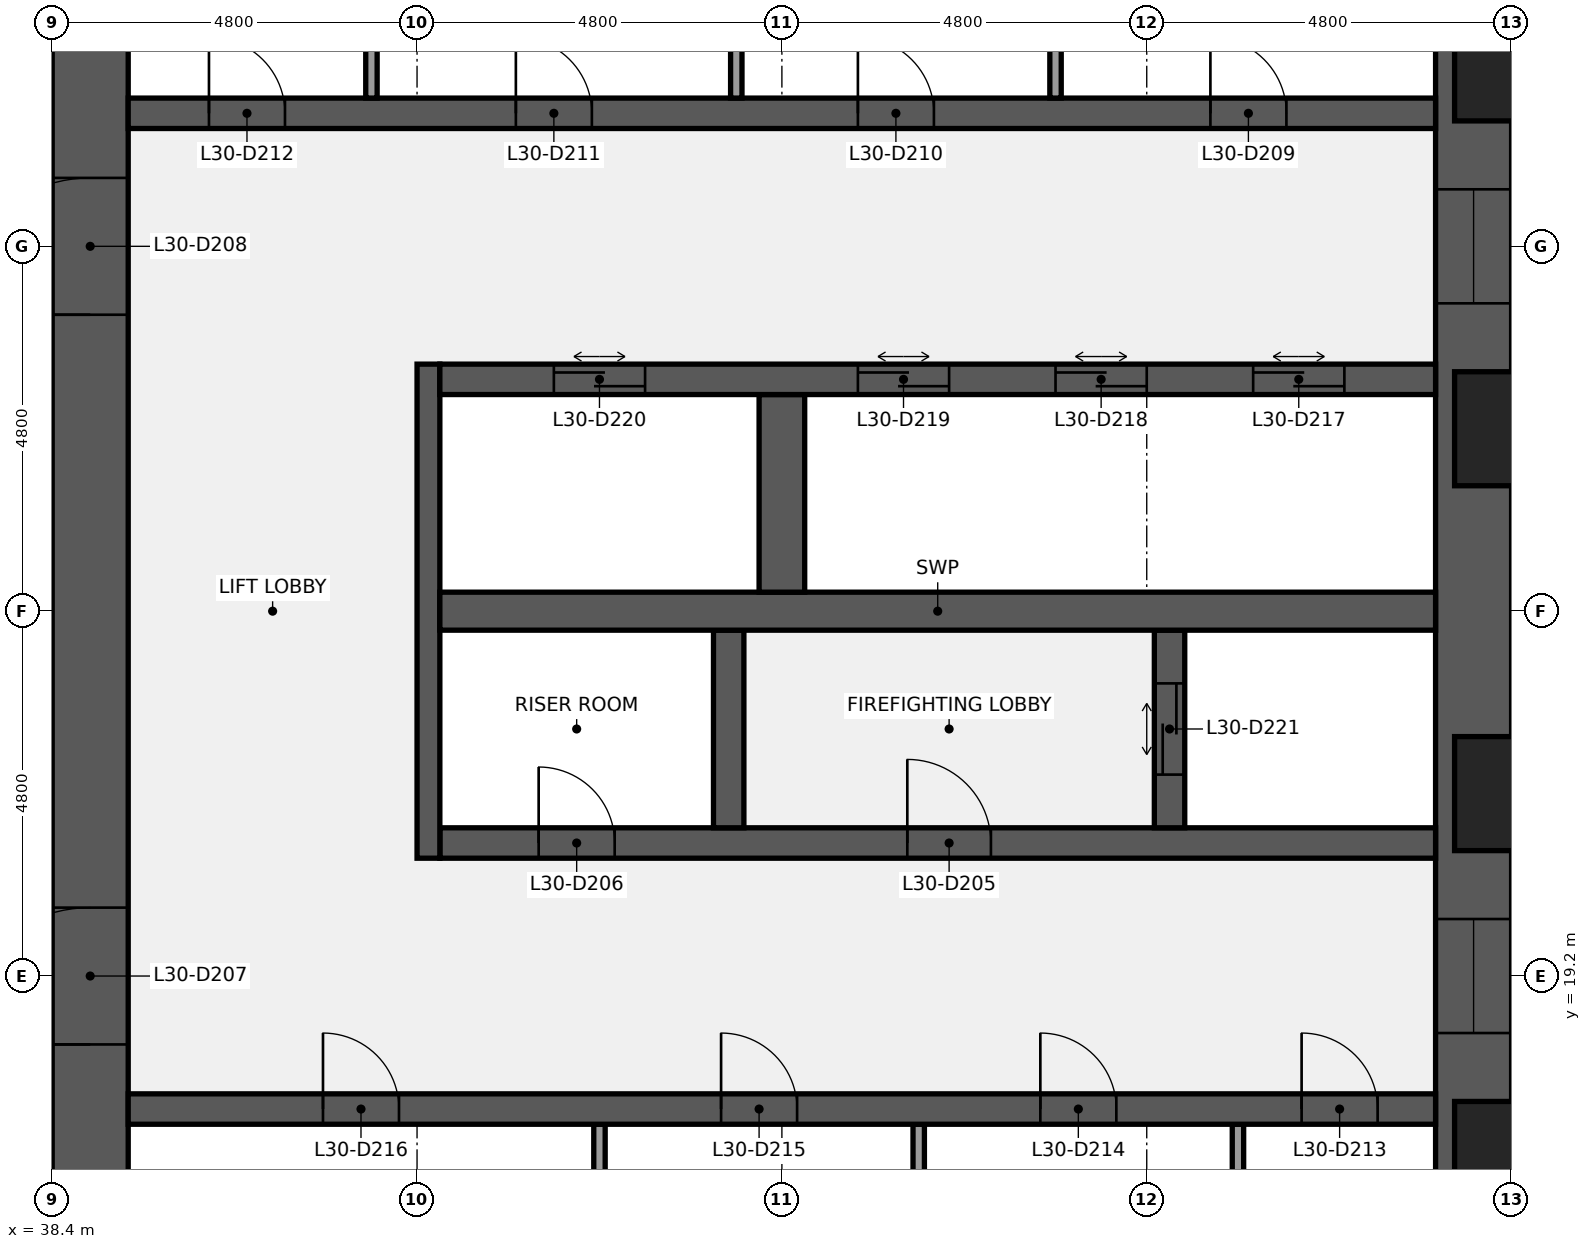
"""IFC4 building model, lengths in metres.
Left out: names, types, materials, properties, quantities, classifications, styles, units other than length and angle.
Written with IfcOpenShell. Run it as: python <this file> out.ifc"""

import sys

from ifc_helpers import new_model, si_unit, direction, frame, frame_2d, origin, place, context, subcontext, project, spatial, rectangle, extrude, element, fill, save


model = new_model("IFC4")
c1 = context("Model", 3, precision=1e-05, world=origin(), true_north=direction((0.0, 1.0)))
c2 = subcontext(c1, "Body", "Model", "MODEL_VIEW")
j1 = project(units=[si_unit("LENGTHUNIT", "METRE"), si_unit("PLANEANGLEUNIT", "RADIAN")], contexts=[c1])
p1 = place(None, origin())
s1 = spatial("IfcSite", under=j1, at=p1, CompositionType="ELEMENT")
p2 = place(p1, origin())
s2 = spatial("IfcBuilding", under=s1, at=p2, CompositionType="ELEMENT")
p3 = place(p2, frame((0.0, 0.0, 140.1)))
s3 = spatial("IfcBuildingStorey", under=s2, at=p3, CompositionType="ELEMENT", Elevation=140.1)
p4 = place(p3, frame((57.1, 38.4, 0.0), z_axis=(0.0, 0.0, 1.0), x_axis=(0.0, -1.0, 0.0)))
e1 = element("IfcWall", 1, at=p4, inside=s3, PredefinedType="SHEAR", context=c2, shape_type="SweptSolid", body=[
    extrude(rectangle(XDim=28.8, YDim=1.0, at=frame_2d((14.4, 0.0))), origin(), (0.0, 0.0, 1.0), 3.84),
])
p5 = place(p4, frame((18.45, 0.0, 0.9)))
e2 = element("IfcOpeningElement", 2, at=p5, cuts=e1, PredefinedType="OPENING", context=c2, shape_type="SweptSolid", body=[
    extrude(rectangle(XDim=1.5, YDim=1.5, at=frame_2d((0.75, 0.75))), frame((0.0, 0.51, 0.0), z_axis=(0.0, -1.0, 0.0), x_axis=(1.0, 0.0, 0.0)), (0.0, 0.0, 1.0), 1.02),
])
p6 = place(p4, frame((8.85, 0.0, 0.9)))
e3 = element("IfcOpeningElement", 3, at=p6, cuts=e1, PredefinedType="OPENING", context=c2, shape_type="SweptSolid", body=[
    extrude(rectangle(XDim=1.5, YDim=1.5, at=frame_2d((0.75, 0.75))), frame((0.0, 0.51, 0.0), z_axis=(0.0, -1.0, 0.0), x_axis=(1.0, 0.0, 0.0)), (0.0, 0.0, 1.0), 1.02),
])
p7 = place(p3, frame((38.9, 9.6, 0.0), z_axis=(0.0, 0.0, 1.0), x_axis=(0.0, 1.0, 0.0)))
e4 = element("IfcWall", 4, at=p7, inside=s3, PredefinedType="SHEAR", context=c2, shape_type="SweptSolid", body=[
    extrude(rectangle(XDim=28.8, YDim=1.0, at=frame_2d((14.4, 0.0))), origin(), (0.0, 0.0, 1.0), 3.84),
])
p8 = place(p7, frame((8.7, 0.0, 0.0)))
e5 = element("IfcOpeningElement", 5, at=p8, cuts=e4, PredefinedType="OPENING", context=c2, shape_type="SweptSolid", body=[
    extrude(rectangle(XDim=1.8, YDim=2.1, at=frame_2d((0.9, 1.05))), frame((0.0, 0.51, 0.0), z_axis=(0.0, -1.0, 0.0), x_axis=(1.0, 0.0, 0.0)), (0.0, 0.0, 1.0), 1.02),
])
p9 = place(p7, frame((18.3, 0.0, 0.0)))
e6 = element("IfcOpeningElement", 6, at=p9, cuts=e4, PredefinedType="OPENING", context=c2, shape_type="SweptSolid", body=[
    extrude(rectangle(XDim=1.8, YDim=2.1, at=frame_2d((0.9, 1.05))), frame((0.0, 0.51, 0.0), z_axis=(0.0, -1.0, 0.0), x_axis=(1.0, 0.0, 0.0)), (0.0, 0.0, 1.0), 1.02),
])
for number, where, z_axis, x_axis in (
    (7, (54.0, 14.65, 0.0), (0.0, 0.0, 1.0), (0.0, 1.0, 0.0)),
    (8, (49.8, 14.65, 0.0), (0.0, 0.0, 1.0), (0.0, 1.0, 0.0)),
    (9, (45.6, 14.65, 0.0), (0.0, 0.0, 1.0), (0.0, 1.0, 0.0)),
):
    element("IfcWall", number, at=place(p3, frame(where, z_axis=z_axis, x_axis=x_axis)), inside=s3, PredefinedType="PARTITIONING", context=c2, shape_type="SweptSolid", body=[
        extrude(rectangle(XDim=2.6, YDim=0.15, at=frame_2d((1.3, 0.0))), origin(), (0.0, 0.0, 1.0), 3.84),
    ])
p10 = place(p3, frame((39.4, 17.45, 0.0), z_axis=(0.0, 0.0, 1.0), x_axis=(1.0, 0.0, 0.0)))
e10 = element("IfcWall", 10, at=p10, inside=s3, PredefinedType="SHEAR", context=c2, shape_type="SweptSolid", body=[
    extrude(rectangle(XDim=17.2, YDim=0.4, at=frame_2d((8.6, 0.0))), origin(), (0.0, 0.0, 1.0), 3.84),
])
p11 = place(p10, frame((15.438, 0.0, 0.0)))
e11 = element("IfcOpeningElement", 11, at=p11, cuts=e10, PredefinedType="OPENING", context=c2, shape_type="SweptSolid", body=[
    extrude(rectangle(XDim=1.0, YDim=2.1, at=frame_2d((0.5, 1.05))), frame((0.0, 0.21, 0.0), z_axis=(0.0, -1.0, 0.0), x_axis=(1.0, 0.0, 0.0)), (0.0, 0.0, 1.0), 0.42),
])
p12 = place(p10, frame((12.0, 0.0, 0.0)))
e12 = element("IfcOpeningElement", 12, at=p12, cuts=e10, PredefinedType="OPENING", context=c2, shape_type="SweptSolid", body=[
    extrude(rectangle(XDim=1.0, YDim=2.1, at=frame_2d((0.5, 1.05))), frame((0.0, 0.21, 0.0), z_axis=(0.0, -1.0, 0.0), x_axis=(1.0, 0.0, 0.0)), (0.0, 0.0, 1.0), 0.42),
])
p13 = place(p10, frame((7.8, 0.0, 0.0)))
e13 = element("IfcOpeningElement", 13, at=p13, cuts=e10, PredefinedType="OPENING", context=c2, shape_type="SweptSolid", body=[
    extrude(rectangle(XDim=1.0, YDim=2.1, at=frame_2d((0.5, 1.05))), frame((0.0, 0.21, 0.0), z_axis=(0.0, -1.0, 0.0), x_axis=(1.0, 0.0, 0.0)), (0.0, 0.0, 1.0), 0.42),
])
p14 = place(p10, frame((2.562, 0.0, 0.0)))
e14 = element("IfcOpeningElement", 14, at=p14, cuts=e10, PredefinedType="OPENING", context=c2, shape_type="SweptSolid", body=[
    extrude(rectangle(XDim=1.0, YDim=2.1, at=frame_2d((0.5, 1.05))), frame((0.0, 0.21, 0.0), z_axis=(0.0, -1.0, 0.0), x_axis=(1.0, 0.0, 0.0)), (0.0, 0.0, 1.0), 0.42),
])
p15 = place(p3, frame((43.5, 20.95, 0.0), z_axis=(0.0, 0.0, 1.0), x_axis=(1.0, 0.0, 0.0)))
e15 = element("IfcWall", 15, at=p15, inside=s3, PredefinedType="SHEAR", context=c2, shape_type="SweptSolid", body=[
    extrude(rectangle(XDim=13.1, YDim=0.4, at=frame_2d((6.55, 0.0))), origin(), (0.0, 0.0, 1.0), 3.84),
])
p16 = place(p15, frame((6.15, 0.0, 0.0)))
e16 = element("IfcOpeningElement", 16, at=p16, cuts=e15, PredefinedType="OPENING", context=c2, shape_type="SweptSolid", body=[
    extrude(rectangle(XDim=1.1, YDim=2.1, at=frame_2d((0.55, 1.05))), frame((0.0, 0.21, 0.0), z_axis=(0.0, -1.0, 0.0), x_axis=(1.0, 0.0, 0.0)), (0.0, 0.0, 1.0), 0.42),
])
p17 = place(p15, frame((1.3, 0.0, 0.0)))
e17 = element("IfcOpeningElement", 17, at=p17, cuts=e15, PredefinedType="OPENING", context=c2, shape_type="SweptSolid", body=[
    extrude(rectangle(XDim=1.0, YDim=2.1, at=frame_2d((0.5, 1.05))), frame((0.0, 0.21, 0.0), z_axis=(0.0, -1.0, 0.0), x_axis=(1.0, 0.0, 0.0)), (0.0, 0.0, 1.0), 0.42),
])
p18 = place(p3, frame((43.35, 20.75, 0.0), z_axis=(0.0, 0.0, 1.0), x_axis=(0.0, 1.0, 0.0)))
e18 = element("IfcWall", 18, at=p18, inside=s3, PredefinedType="SHEAR", context=c2, shape_type="SweptSolid", body=[
    extrude(rectangle(XDim=6.5, YDim=0.3, at=frame_2d((3.25, 0.0))), origin(), (0.0, 0.0, 1.0), 3.84),
])
p19 = place(p3, frame((53.1, 21.15, 0.0), z_axis=(0.0, 0.0, 1.0), x_axis=(0.0, 1.0, 0.0)))
e19 = element("IfcWall", 19, at=p19, inside=s3, PredefinedType="SHEAR", context=c2, shape_type="SweptSolid", body=[
    extrude(rectangle(XDim=2.6, YDim=0.4, at=frame_2d((1.3, 0.0))), origin(), (0.0, 0.0, 1.0), 3.84),
])
p20 = place(p19, frame((0.7, 0.0, 0.0)))
e20 = element("IfcOpeningElement", 20, at=p20, cuts=e19, PredefinedType="OPENING", context=c2, shape_type="SweptSolid", body=[
    extrude(rectangle(XDim=1.2, YDim=2.1, at=frame_2d((0.6, 1.05))), frame((0.0, 0.21, 0.0), z_axis=(0.0, -1.0, 0.0), x_axis=(1.0, 0.0, 0.0)), (0.0, 0.0, 1.0), 0.42),
])
p21 = place(p3, frame((47.3, 21.15, 0.0), z_axis=(0.0, 0.0, 1.0), x_axis=(0.0, 1.0, 0.0)))
e21 = element("IfcWall", 21, at=p21, inside=s3, PredefinedType="SHEAR", context=c2, shape_type="SweptSolid", body=[
    extrude(rectangle(XDim=2.6, YDim=0.4, at=frame_2d((1.3, 0.0))), origin(), (0.0, 0.0, 1.0), 3.84),
])
p22 = place(p3, frame((43.5, 24.0, 0.0), z_axis=(0.0, 0.0, 1.0), x_axis=(1.0, 0.0, 0.0)))
e22 = element("IfcWall", 22, at=p22, inside=s3, PredefinedType="SHEAR", context=c2, shape_type="SweptSolid", body=[
    extrude(rectangle(XDim=13.1, YDim=0.5, at=frame_2d((6.55, 0.0))), origin(), (0.0, 0.0, 1.0), 3.84),
])
p23 = place(p3, frame((48.0, 24.25, 0.0), z_axis=(0.0, 0.0, 1.0), x_axis=(0.0, 1.0, 0.0)))
e23 = element("IfcWall", 23, at=p23, inside=s3, PredefinedType="SHEAR", context=c2, shape_type="SweptSolid", body=[
    extrude(rectangle(XDim=2.6, YDim=0.6, at=frame_2d((1.3, 0.0))), origin(), (0.0, 0.0, 1.0), 3.84),
])
p24 = place(p3, frame((43.5, 27.05, 0.0), z_axis=(0.0, 0.0, 1.0), x_axis=(1.0, 0.0, 0.0)))
e24 = element("IfcWall", 24, at=p24, inside=s3, PredefinedType="SHEAR", context=c2, shape_type="SweptSolid", body=[
    extrude(rectangle(XDim=13.1, YDim=0.4, at=frame_2d((6.55, 0.0))), origin(), (0.0, 0.0, 1.0), 3.84),
])
p25 = place(p24, frame((10.7, 0.0, 0.0)))
e25 = element("IfcOpeningElement", 25, at=p25, cuts=e24, PredefinedType="OPENING", context=c2, shape_type="SweptSolid", body=[
    extrude(rectangle(XDim=1.2, YDim=2.1, at=frame_2d((0.6, 1.05))), frame((0.0, 0.21, 0.0), z_axis=(0.0, -1.0, 0.0), x_axis=(1.0, 0.0, 0.0)), (0.0, 0.0, 1.0), 0.42),
])
p26 = place(p24, frame((8.1, 0.0, 0.0)))
e26 = element("IfcOpeningElement", 26, at=p26, cuts=e24, PredefinedType="OPENING", context=c2, shape_type="SweptSolid", body=[
    extrude(rectangle(XDim=1.2, YDim=2.1, at=frame_2d((0.6, 1.05))), frame((0.0, 0.21, 0.0), z_axis=(0.0, -1.0, 0.0), x_axis=(1.0, 0.0, 0.0)), (0.0, 0.0, 1.0), 0.42),
])
p27 = place(p24, frame((5.5, 0.0, 0.0)))
e27 = element("IfcOpeningElement", 27, at=p27, cuts=e24, PredefinedType="OPENING", context=c2, shape_type="SweptSolid", body=[
    extrude(rectangle(XDim=1.2, YDim=2.1, at=frame_2d((0.6, 1.05))), frame((0.0, 0.21, 0.0), z_axis=(0.0, -1.0, 0.0), x_axis=(1.0, 0.0, 0.0)), (0.0, 0.0, 1.0), 0.42),
])
p28 = place(p24, frame((1.5, 0.0, 0.0)))
e28 = element("IfcOpeningElement", 28, at=p28, cuts=e24, PredefinedType="OPENING", context=c2, shape_type="SweptSolid", body=[
    extrude(rectangle(XDim=1.2, YDim=2.1, at=frame_2d((0.6, 1.05))), frame((0.0, 0.21, 0.0), z_axis=(0.0, -1.0, 0.0), x_axis=(1.0, 0.0, 0.0)), (0.0, 0.0, 1.0), 0.42),
])
p29 = place(p3, frame((39.4, 30.55, 0.0), z_axis=(0.0, 0.0, 1.0), x_axis=(1.0, 0.0, 0.0)))
e29 = element("IfcWall", 29, at=p29, inside=s3, PredefinedType="SHEAR", context=c2, shape_type="SweptSolid", body=[
    extrude(rectangle(XDim=17.2, YDim=0.4, at=frame_2d((8.6, 0.0))), origin(), (0.0, 0.0, 1.0), 3.84),
])
p30 = place(p29, frame((14.238, 0.0, 0.0)))
e30 = element("IfcOpeningElement", 30, at=p30, cuts=e29, PredefinedType="OPENING", context=c2, shape_type="SweptSolid", body=[
    extrude(rectangle(XDim=1.0, YDim=2.1, at=frame_2d((0.5, 1.05))), frame((0.0, 0.21, 0.0), z_axis=(0.0, -1.0, 0.0), x_axis=(1.0, 0.0, 0.0)), (0.0, 0.0, 1.0), 0.42),
])
p31 = place(p29, frame((9.6, 0.0, 0.0)))
e31 = element("IfcOpeningElement", 31, at=p31, cuts=e29, PredefinedType="OPENING", context=c2, shape_type="SweptSolid", body=[
    extrude(rectangle(XDim=1.0, YDim=2.1, at=frame_2d((0.5, 1.05))), frame((0.0, 0.21, 0.0), z_axis=(0.0, -1.0, 0.0), x_axis=(1.0, 0.0, 0.0)), (0.0, 0.0, 1.0), 0.42),
])
p32 = place(p29, frame((5.1, 0.0, 0.0)))
e32 = element("IfcOpeningElement", 32, at=p32, cuts=e29, PredefinedType="OPENING", context=c2, shape_type="SweptSolid", body=[
    extrude(rectangle(XDim=1.0, YDim=2.1, at=frame_2d((0.5, 1.05))), frame((0.0, 0.21, 0.0), z_axis=(0.0, -1.0, 0.0), x_axis=(1.0, 0.0, 0.0)), (0.0, 0.0, 1.0), 0.42),
])
p33 = place(p29, frame((1.062, 0.0, 0.0)))
e33 = element("IfcOpeningElement", 33, at=p33, cuts=e29, PredefinedType="OPENING", context=c2, shape_type="SweptSolid", body=[
    extrude(rectangle(XDim=1.0, YDim=2.1, at=frame_2d((0.5, 1.05))), frame((0.0, 0.21, 0.0), z_axis=(0.0, -1.0, 0.0), x_axis=(1.0, 0.0, 0.0)), (0.0, 0.0, 1.0), 0.42),
])
for number, where, z_axis, x_axis in (
    (34, (51.6, 30.75, 0.0), (0.0, 0.0, 1.0), (0.0, 1.0, 0.0)),
    (35, (47.4, 30.75, 0.0), (0.0, 0.0, 1.0), (0.0, 1.0, 0.0)),
    (36, (42.6, 30.75, 0.0), (0.0, 0.0, 1.0), (0.0, 1.0, 0.0)),
):
    element("IfcWall", number, at=place(p3, frame(where, z_axis=z_axis, x_axis=x_axis)), inside=s3, PredefinedType="PARTITIONING", context=c2, shape_type="SweptSolid", body=[
        extrude(rectangle(XDim=2.6, YDim=0.15, at=frame_2d((1.3, 0.0))), origin(), (0.0, 0.0, 1.0), 3.84),
    ])
p34 = place(p16, origin())
e37 = element("IfcDoor", 37, at=p34, inside=s3, OperationType="SINGLE_SWING_LEFT", PredefinedType="DOOR", context=c2, shape_type="SweptSolid", body=[
    extrude(rectangle(XDim=1.1, YDim=2.1, at=frame_2d((0.55, 1.05))), frame((0.0, 0.025, 0.0), z_axis=(0.0, -1.0, 0.0), x_axis=(1.0, 0.0, 0.0)), (0.0, 0.0, 1.0), 0.05),
])
fill(e16, e37)
p35 = place(p17, origin())
e38 = element("IfcDoor", 38, at=p35, inside=s3, OperationType="SINGLE_SWING_LEFT", PredefinedType="DOOR", context=c2, shape_type="SweptSolid", body=[
    extrude(rectangle(XDim=1.0, YDim=2.1, at=frame_2d((0.5, 1.05))), frame((0.0, 0.025, 0.0), z_axis=(0.0, -1.0, 0.0), x_axis=(1.0, 0.0, 0.0)), (0.0, 0.0, 1.0), 0.05),
])
fill(e17, e38)
p36 = place(p8, origin())
e39 = element("IfcDoor", 39, at=p36, inside=s3, OperationType="DOUBLE_DOOR_SINGLE_SWING", PredefinedType="DOOR", context=c2, shape_type="SweptSolid", body=[
    extrude(rectangle(XDim=1.8, YDim=2.1, at=frame_2d((0.9, 1.05))), frame((0.0, 0.025, 0.0), z_axis=(0.0, -1.0, 0.0), x_axis=(1.0, 0.0, 0.0)), (0.0, 0.0, 1.0), 0.05),
])
fill(e5, e39)
p37 = place(p9, origin())
e40 = element("IfcDoor", 40, at=p37, inside=s3, OperationType="DOUBLE_DOOR_SINGLE_SWING", PredefinedType="DOOR", context=c2, shape_type="SweptSolid", body=[
    extrude(rectangle(XDim=1.8, YDim=2.1, at=frame_2d((0.9, 1.05))), frame((0.0, 0.025, 0.0), z_axis=(0.0, -1.0, 0.0), x_axis=(1.0, 0.0, 0.0)), (0.0, 0.0, 1.0), 0.05),
])
fill(e6, e40)
p38 = place(p30, origin())
e41 = element("IfcDoor", 41, at=p38, inside=s3, OperationType="SINGLE_SWING_LEFT", PredefinedType="DOOR", context=c2, shape_type="SweptSolid", body=[
    extrude(rectangle(XDim=1.0, YDim=2.1, at=frame_2d((0.5, 1.05))), frame((0.0, 0.025, 0.0), z_axis=(0.0, -1.0, 0.0), x_axis=(1.0, 0.0, 0.0)), (0.0, 0.0, 1.0), 0.05),
])
fill(e30, e41)
p39 = place(p31, origin())
e42 = element("IfcDoor", 42, at=p39, inside=s3, OperationType="SINGLE_SWING_LEFT", PredefinedType="DOOR", context=c2, shape_type="SweptSolid", body=[
    extrude(rectangle(XDim=1.0, YDim=2.1, at=frame_2d((0.5, 1.05))), frame((0.0, 0.025, 0.0), z_axis=(0.0, -1.0, 0.0), x_axis=(1.0, 0.0, 0.0)), (0.0, 0.0, 1.0), 0.05),
])
fill(e31, e42)
p40 = place(p32, origin())
e43 = element("IfcDoor", 43, at=p40, inside=s3, OperationType="SINGLE_SWING_LEFT", PredefinedType="DOOR", context=c2, shape_type="SweptSolid", body=[
    extrude(rectangle(XDim=1.0, YDim=2.1, at=frame_2d((0.5, 1.05))), frame((0.0, 0.025, 0.0), z_axis=(0.0, -1.0, 0.0), x_axis=(1.0, 0.0, 0.0)), (0.0, 0.0, 1.0), 0.05),
])
fill(e32, e43)
p41 = place(p33, origin())
e44 = element("IfcDoor", 44, at=p41, inside=s3, OperationType="SINGLE_SWING_LEFT", PredefinedType="DOOR", context=c2, shape_type="SweptSolid", body=[
    extrude(rectangle(XDim=1.0, YDim=2.1, at=frame_2d((0.5, 1.05))), frame((0.0, 0.025, 0.0), z_axis=(0.0, -1.0, 0.0), x_axis=(1.0, 0.0, 0.0)), (0.0, 0.0, 1.0), 0.05),
])
fill(e33, e44)
p42 = place(p11, origin())
e45 = element("IfcDoor", 45, at=p42, inside=s3, OperationType="SINGLE_SWING_LEFT", PredefinedType="DOOR", context=c2, shape_type="SweptSolid", body=[
    extrude(rectangle(XDim=1.0, YDim=2.1, at=frame_2d((0.5, 1.05))), frame((0.0, 0.025, 0.0), z_axis=(0.0, -1.0, 0.0), x_axis=(1.0, 0.0, 0.0)), (0.0, 0.0, 1.0), 0.05),
])
fill(e11, e45)
p43 = place(p12, origin())
e46 = element("IfcDoor", 46, at=p43, inside=s3, OperationType="SINGLE_SWING_LEFT", PredefinedType="DOOR", context=c2, shape_type="SweptSolid", body=[
    extrude(rectangle(XDim=1.0, YDim=2.1, at=frame_2d((0.5, 1.05))), frame((0.0, 0.025, 0.0), z_axis=(0.0, -1.0, 0.0), x_axis=(1.0, 0.0, 0.0)), (0.0, 0.0, 1.0), 0.05),
])
fill(e12, e46)
p44 = place(p13, origin())
e47 = element("IfcDoor", 47, at=p44, inside=s3, OperationType="SINGLE_SWING_LEFT", PredefinedType="DOOR", context=c2, shape_type="SweptSolid", body=[
    extrude(rectangle(XDim=1.0, YDim=2.1, at=frame_2d((0.5, 1.05))), frame((0.0, 0.025, 0.0), z_axis=(0.0, -1.0, 0.0), x_axis=(1.0, 0.0, 0.0)), (0.0, 0.0, 1.0), 0.05),
])
fill(e13, e47)
p45 = place(p14, origin())
e48 = element("IfcDoor", 48, at=p45, inside=s3, OperationType="SINGLE_SWING_LEFT", PredefinedType="DOOR", context=c2, shape_type="SweptSolid", body=[
    extrude(rectangle(XDim=1.0, YDim=2.1, at=frame_2d((0.5, 1.05))), frame((0.0, 0.025, 0.0), z_axis=(0.0, -1.0, 0.0), x_axis=(1.0, 0.0, 0.0)), (0.0, 0.0, 1.0), 0.05),
])
fill(e14, e48)
p46 = place(p25, origin())
e49 = element("IfcDoor", 49, at=p46, inside=s3, OperationType="DOUBLE_DOOR_SLIDING", PredefinedType="DOOR", context=c2, shape_type="SweptSolid", body=[
    extrude(rectangle(XDim=1.2, YDim=2.1, at=frame_2d((0.6, 1.05))), frame((0.0, 0.025, 0.0), z_axis=(0.0, -1.0, 0.0), x_axis=(1.0, 0.0, 0.0)), (0.0, 0.0, 1.0), 0.05),
])
fill(e25, e49)
p47 = place(p26, origin())
e50 = element("IfcDoor", 50, at=p47, inside=s3, OperationType="DOUBLE_DOOR_SLIDING", PredefinedType="DOOR", context=c2, shape_type="SweptSolid", body=[
    extrude(rectangle(XDim=1.2, YDim=2.1, at=frame_2d((0.6, 1.05))), frame((0.0, 0.025, 0.0), z_axis=(0.0, -1.0, 0.0), x_axis=(1.0, 0.0, 0.0)), (0.0, 0.0, 1.0), 0.05),
])
fill(e26, e50)
p48 = place(p27, origin())
e51 = element("IfcDoor", 51, at=p48, inside=s3, OperationType="DOUBLE_DOOR_SLIDING", PredefinedType="DOOR", context=c2, shape_type="SweptSolid", body=[
    extrude(rectangle(XDim=1.2, YDim=2.1, at=frame_2d((0.6, 1.05))), frame((0.0, 0.025, 0.0), z_axis=(0.0, -1.0, 0.0), x_axis=(1.0, 0.0, 0.0)), (0.0, 0.0, 1.0), 0.05),
])
fill(e27, e51)
p49 = place(p28, origin())
e52 = element("IfcDoor", 52, at=p49, inside=s3, OperationType="DOUBLE_DOOR_SLIDING", PredefinedType="DOOR", context=c2, shape_type="SweptSolid", body=[
    extrude(rectangle(XDim=1.2, YDim=2.1, at=frame_2d((0.6, 1.05))), frame((0.0, 0.025, 0.0), z_axis=(0.0, -1.0, 0.0), x_axis=(1.0, 0.0, 0.0)), (0.0, 0.0, 1.0), 0.05),
])
fill(e28, e52)
p50 = place(p20, origin())
e53 = element("IfcDoor", 53, at=p50, inside=s3, OperationType="DOUBLE_DOOR_SLIDING", PredefinedType="DOOR", context=c2, shape_type="SweptSolid", body=[
    extrude(rectangle(XDim=1.2, YDim=2.1, at=frame_2d((0.6, 1.05))), frame((0.0, 0.025, 0.0), z_axis=(0.0, -1.0, 0.0), x_axis=(1.0, 0.0, 0.0)), (0.0, 0.0, 1.0), 0.05),
])
fill(e20, e53)
p51 = place(p5, origin())
e54 = element("IfcWindow", 54, at=p51, inside=s3, PartitioningType="SINGLE_PANEL", PredefinedType="WINDOW", context=c2, shape_type="SweptSolid", body=[
    extrude(rectangle(XDim=1.5, YDim=1.5, at=frame_2d((0.75, 0.75))), frame((0.0, 0.03, 0.0), z_axis=(0.0, -1.0, 0.0), x_axis=(1.0, 0.0, 0.0)), (0.0, 0.0, 1.0), 0.06),
])
fill(e2, e54)
p52 = place(p6, origin())
e55 = element("IfcWindow", 55, at=p52, inside=s3, PartitioningType="SINGLE_PANEL", PredefinedType="WINDOW", context=c2, shape_type="SweptSolid", body=[
    extrude(rectangle(XDim=1.5, YDim=1.5, at=frame_2d((0.75, 0.75))), frame((0.0, 0.03, 0.0), z_axis=(0.0, -1.0, 0.0), x_axis=(1.0, 0.0, 0.0)), (0.0, 0.0, 1.0), 0.06),
])
fill(e3, e55)
save(model, sys.argv[1])
